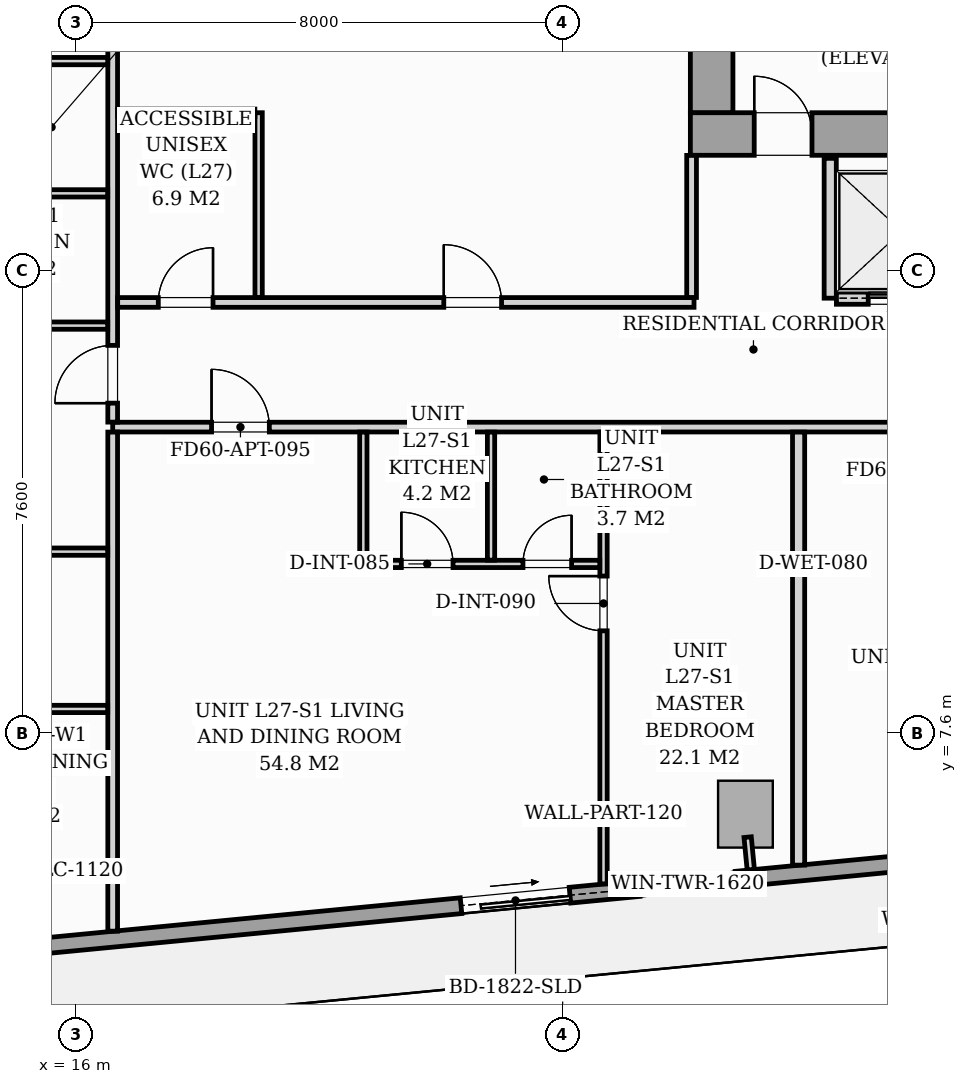
"""IFC4 building model, lengths in metres.
Left out: names, types, materials, properties, quantities, classifications, styles, units other than length and angle.
Written with IfcOpenShell. Run it as: python <this file> out.ifc"""

import sys

from ifc_helpers import new_model, si_unit, direction, frame, frame_2d, origin, origin_2d, place, context, subcontext, project, spatial, rectangle, i_section, extrude, source, transform, mapped, element, fill, save


model = new_model("IFC4")
c1 = context("Model", 3, precision=1e-05, world=origin(), true_north=direction((0.0, 1.0)))
c2 = subcontext(c1, "Body", "Model", "MODEL_VIEW")
j1 = project(units=[si_unit("LENGTHUNIT", "METRE"), si_unit("PLANEANGLEUNIT", "RADIAN")], contexts=[c1])
p1 = place(None, origin())
s1 = spatial("IfcSite", under=j1, at=p1, CompositionType="ELEMENT")
p2 = place(p1, origin())
s2 = spatial("IfcBuilding", under=s1, at=p2, CompositionType="ELEMENT")
p3 = place(p2, frame((0.0, 0.0, 97.0)))
s3 = spatial("IfcBuildingStorey", under=s2, at=p3, CompositionType="ELEMENT", Elevation=97.0)
m1 = source(origin(), c2, "Body", "SweptSolid", [
    extrude(i_section(OverallWidth=0.427, OverallDepth=0.483, WebThickness=0.051, FlangeThickness=0.082, FilletRadius=0.018, at=origin_2d()), origin(), (0.0, 0.0, 1.0), 3.196),
])
p4 = place(p3, frame((26.4, 17.4, 0.002), z_axis=(0.0, 0.0, 1.0), x_axis=(1.0, 0.0, 0.0)))
e1 = element("IfcColumn", 1, at=p4, inside=s3, PredefinedType="PILASTER", context=c2, shape_type="MappedRepresentation", body=[
    mapped(m1, transform((0.0, 0.0, 0.0), scale=1.0)),
])
m2 = source(origin(), c2, "Body", "SweptSolid", [
    extrude(rectangle(XDim=0.9, YDim=1.1, at=origin_2d()), origin(), (0.0, 0.0, 1.0), 3.196),
])
p5 = place(p3, frame((27.006, 6.265, 0.002), z_axis=(0.0, 0.0, 1.0), x_axis=(0.995396198367, 0.09584575252, 0.0)))
e2 = element("IfcColumn", 2, at=p5, inside=s3, PredefinedType="COLUMN", context=c2, shape_type="MappedRepresentation", body=[
    mapped(m2, transform((0.0, 0.0, 0.0), scale=1.0)),
])
p6 = place(p3, frame((31.994, 5.69, 0.0), z_axis=(0.0, 0.0, 1.0), x_axis=(-0.995396521236, -0.095842399342, 0.0)))
e3 = element("IfcWall", 3, at=p6, inside=s3, PredefinedType="STANDARD", context=c2, shape_type="SweptSolid", body=[
    extrude(rectangle(XDim=19.11, YDim=0.26, at=frame_2d((9.555, 0.0))), origin(), (0.0, 0.0, 1.0), 2.94),
])
p7 = place(p6, frame((7.91, 0.0, 0.0)))
e4 = element("IfcOpeningElement", 4, at=p7, cuts=e3, PredefinedType="OPENING", context=c2, shape_type="SweptSolid", body=[
    extrude(rectangle(XDim=1.8, YDim=2.06, at=frame_2d((0.9, 1.03))), frame((0.0, 0.14, 0.0), z_axis=(0.0, -1.0, 0.0), x_axis=(1.0, 0.0, 0.0)), (0.0, 0.0, 1.0), 0.28),
])
p8 = place(p6, frame((0.7, 0.0, 0.65)))
e5 = element("IfcOpeningElement", 5, at=p8, cuts=e3, PredefinedType="OPENING", context=c2, shape_type="SweptSolid", body=[
    extrude(rectangle(XDim=1.6, YDim=1.5, at=frame_2d((0.8, 0.75))), frame((0.0, 0.14, 0.0), z_axis=(0.0, -1.0, 0.0), x_axis=(1.0, 0.0, 0.0)), (0.0, 0.0, 1.0), 0.28),
])
p9 = place(p6, frame((5.167, 0.0, 0.75)))
e6 = element("IfcOpeningElement", 6, at=p9, cuts=e3, PredefinedType="OPENING", context=c2, shape_type="SweptSolid", body=[
    extrude(rectangle(XDim=1.6, YDim=1.5, at=frame_2d((0.8, 0.75))), frame((0.0, 0.14, 0.0), z_axis=(0.0, -1.0, 0.0), x_axis=(1.0, 0.0, 0.0)), (0.0, 0.0, 1.0), 0.28),
])
p10 = place(p3, frame((26.1, 17.45, 0.0), z_axis=(0.0, 0.0, 1.0), x_axis=(1.0, 0.0, 0.0)))
e7 = element("IfcWall", 7, at=p10, inside=s3, PredefinedType="SHEAR", context=c2, shape_type="SweptSolid", body=[
    extrude(rectangle(XDim=19.8, YDim=0.7, at=frame_2d((9.9, 0.0))), origin(), (0.0, 0.0, 1.0), 3.2),
])
p11 = place(p10, frame((1.05, 0.0, 0.0)))
e8 = element("IfcOpeningElement", 8, at=p11, cuts=e7, PredefinedType="OPENING", context=c2, shape_type="SweptSolid", body=[
    extrude(rectangle(XDim=0.95, YDim=2.06, at=frame_2d((0.475, 1.03))), frame((0.0, 0.36, 0.0), z_axis=(0.0, -1.0, 0.0), x_axis=(1.0, 0.0, 0.0)), (0.0, 0.0, 1.0), 0.72),
])
p12 = place(p10, frame((9.48, 0.0, 0.0)))
e9 = element("IfcOpeningElement", 9, at=p12, cuts=e7, PredefinedType="OPENING", context=c2, shape_type="SweptSolid", body=[
    extrude(rectangle(XDim=0.85, YDim=2.0, at=frame_2d((0.425, 1.0))), frame((0.0, 0.36, 0.0), z_axis=(0.0, -1.0, 0.0), x_axis=(1.0, 0.0, 0.0)), (0.0, 0.0, 1.0), 0.72),
])
p13 = place(p10, frame((17.65, 0.0, 0.0)))
e10 = element("IfcOpeningElement", 10, at=p13, cuts=e7, PredefinedType="OPENING", context=c2, shape_type="SweptSolid", body=[
    extrude(rectangle(XDim=0.95, YDim=2.06, at=frame_2d((0.475, 1.03))), frame((0.0, 0.36, 0.0), z_axis=(0.0, -1.0, 0.0), x_axis=(1.0, 0.0, 0.0)), (0.0, 0.0, 1.0), 0.72),
])
p14 = place(p3, frame((26.45, 17.802, 0.0), z_axis=(0.0, 0.0, 1.0), x_axis=(0.0, 1.0, 0.0)))
e11 = element("IfcWall", 11, at=p14, inside=s3, PredefinedType="SHEAR", context=c2, shape_type="SweptSolid", body=[
    extrude(rectangle(XDim=5.796, YDim=0.7, at=frame_2d((2.898, 0.0))), origin(), (0.0, 0.0, 1.0), 3.2),
])
p15 = place(p3, frame((28.4, 14.75, 0.0), z_axis=(0.0, 0.0, 1.0), x_axis=(0.0, 1.0, 0.0)))
e12 = element("IfcWall", 12, at=p15, inside=s3, PredefinedType="PARTITIONING", context=c2, shape_type="SweptSolid", body=[
    extrude(rectangle(XDim=2.3, YDim=0.2, at=frame_2d((1.15, 0.0))), origin(), (0.0, 0.0, 1.0), 2.94),
])
p16 = place(p3, frame((28.502, 14.75, 0.0), z_axis=(0.0, 0.0, 1.0), x_axis=(1.0, 0.0, 0.0)))
e13 = element("IfcWall", 13, at=p16, inside=s3, PredefinedType="PARTITIONING", context=c2, shape_type="SweptSolid", body=[
    extrude(rectangle(XDim=2.146, YDim=0.2, at=frame_2d((1.073, 0.0))), origin(), (0.0, 0.0, 1.0), 2.94),
])
p17 = place(p16, frame((0.523, 0.0, 0.0)))
e14 = element("IfcOpeningElement", 14, at=p17, cuts=e13, PredefinedType="OPENING", context=c2, shape_type="SweptSolid", body=[
    extrude(rectangle(XDim=1.05, YDim=2.08, at=frame_2d((0.525, 1.04))), frame((0.0, 0.11, 0.0), z_axis=(0.0, -1.0, 0.0), x_axis=(1.0, 0.0, 0.0)), (0.0, 0.0, 1.0), 0.22),
])
p18 = place(p3, frame((16.6, 12.63, 0.0), z_axis=(0.0, 0.0, 1.0), x_axis=(1.0, 0.0, 0.0)))
e15 = element("IfcWall", 15, at=p18, inside=s3, PredefinedType="PARTITIONING", context=c2, shape_type="SweptSolid", body=[
    extrude(rectangle(XDim=37.6, YDim=0.16, at=frame_2d((18.8, 0.0))), origin(), (0.0, 0.0, 1.0), 2.94),
])
p19 = place(p18, frame((1.626, 0.0, 0.0)))
e16 = element("IfcOpeningElement", 16, at=p19, cuts=e15, PredefinedType="OPENING", context=c2, shape_type="SweptSolid", body=[
    extrude(rectangle(XDim=0.95, YDim=2.06, at=frame_2d((0.475, 1.03))), frame((0.0, 0.09, 0.0), z_axis=(0.0, -1.0, 0.0), x_axis=(1.0, 0.0, 0.0)), (0.0, 0.0, 1.0), 0.18),
])
p20 = place(p18, frame((13.46, 0.0, 0.0)))
e17 = element("IfcOpeningElement", 17, at=p20, cuts=e15, PredefinedType="OPENING", context=c2, shape_type="SweptSolid", body=[
    extrude(rectangle(XDim=0.95, YDim=2.06, at=frame_2d((0.475, 1.03))), frame((0.0, 0.09, 0.0), z_axis=(0.0, -1.0, 0.0), x_axis=(1.0, 0.0, 0.0)), (0.0, 0.0, 1.0), 0.18),
])
p21 = place(p18, frame((26.522, 0.0, 0.0)))
e18 = element("IfcOpeningElement", 18, at=p21, cuts=e15, PredefinedType="OPENING", context=c2, shape_type="SweptSolid", body=[
    extrude(rectangle(XDim=0.95, YDim=2.06, at=frame_2d((0.475, 1.03))), frame((0.0, 0.09, 0.0), z_axis=(0.0, -1.0, 0.0), x_axis=(1.0, 0.0, 0.0)), (0.0, 0.0, 1.0), 0.18),
])
p22 = place(p3, frame((16.6, 4.341, 0.0), z_axis=(0.0, 0.0, 1.0), x_axis=(0.0, 1.0, 0.0)))
e19 = element("IfcWall", 19, at=p22, inside=s3, PredefinedType="PARTITIONING", context=c2, shape_type="SweptSolid", body=[
    extrude(rectangle(XDim=8.207, YDim=0.16, at=frame_2d((4.104, 0.0))), origin(), (0.0, 0.0, 1.0), 2.94),
])
p23 = place(p3, frame((16.6, 12.712, 0.0), z_axis=(0.0, 0.0, 1.0), x_axis=(0.0, 1.0, 0.0)))
e20 = element("IfcWall", 20, at=p23, inside=s3, PredefinedType="PARTITIONING", context=c2, shape_type="SweptSolid", body=[
    extrude(rectangle(XDim=11.195, YDim=0.16, at=frame_2d((5.598, 0.0))), origin(), (0.0, 0.0, 1.0), 2.94),
])
p24 = place(p23, frame((0.312, 0.0, 0.0)))
e21 = element("IfcOpeningElement", 21, at=p24, cuts=e20, PredefinedType="OPENING", context=c2, shape_type="SweptSolid", body=[
    extrude(rectangle(XDim=0.95, YDim=2.06, at=frame_2d((0.475, 1.03))), frame((0.0, 0.09, 0.0), z_axis=(0.0, -1.0, 0.0), x_axis=(1.0, 0.0, 0.0)), (0.0, 0.0, 1.0), 0.18),
])
p25 = place(p3, frame((24.672, 5.118, 0.0), z_axis=(0.0, 0.0, 1.0), x_axis=(0.0, 1.0, 0.0)))
e22 = element("IfcWall", 22, at=p25, inside=s3, PredefinedType="PARTITIONING", context=c2, shape_type="SweptSolid", body=[
    extrude(rectangle(XDim=7.43, YDim=0.12, at=frame_2d((3.715, 0.0))), origin(), (0.0, 0.0, 1.0), 2.94),
])
p26 = place(p25, frame((4.162, 0.0, 0.0)))
e23 = element("IfcOpeningElement", 23, at=p26, cuts=e22, PredefinedType="OPENING", context=c2, shape_type="SweptSolid", body=[
    extrude(rectangle(XDim=0.9, YDim=2.05, at=frame_2d((0.45, 1.025))), frame((0.0, 0.07, 0.0), z_axis=(0.0, -1.0, 0.0), x_axis=(1.0, 0.0, 0.0)), (0.0, 0.0, 1.0), 0.14),
])
p27 = place(p3, frame((20.722, 10.38, 0.0), z_axis=(0.0, 0.0, 1.0), x_axis=(1.0, 0.0, 0.0)))
e24 = element("IfcWall", 24, at=p27, inside=s3, PredefinedType="PARTITIONING", context=c2, shape_type="SweptSolid", body=[
    extrude(rectangle(XDim=3.888, YDim=0.12, at=frame_2d((1.944, 0.0))), origin(), (0.0, 0.0, 1.0), 2.94),
])
p28 = place(p27, frame((0.625, 0.0, 0.0)))
e25 = element("IfcOpeningElement", 25, at=p28, cuts=e24, PredefinedType="OPENING", context=c2, shape_type="SweptSolid", body=[
    extrude(rectangle(XDim=0.85, YDim=2.05, at=frame_2d((0.425, 1.025))), frame((0.0, 0.07, 0.0), z_axis=(0.0, -1.0, 0.0), x_axis=(1.0, 0.0, 0.0)), (0.0, 0.0, 1.0), 0.14),
])
p29 = place(p27, frame((2.625, 0.0, 0.0)))
e26 = element("IfcOpeningElement", 26, at=p29, cuts=e24, PredefinedType="OPENING", context=c2, shape_type="SweptSolid", body=[
    extrude(rectangle(XDim=0.8, YDim=2.02, at=frame_2d((0.4, 1.01))), frame((0.0, 0.07, 0.0), z_axis=(0.0, -1.0, 0.0), x_axis=(1.0, 0.0, 0.0)), (0.0, 0.0, 1.0), 0.14),
])
for number, where, z_axis, x_axis in (
    (27, (22.822, 10.442, 0.0), (0.0, 0.0, 1.0), (0.0, 1.0, 0.0)),
    (28, (20.722, 10.442, 0.0), (0.0, 0.0, 1.0), (0.0, 1.0, 0.0)),
):
    element("IfcWall", number, at=place(p3, frame(where, z_axis=z_axis, x_axis=x_axis)), inside=s3, PredefinedType="PARTITIONING", context=c2, shape_type="SweptSolid", body=[
        extrude(rectangle(XDim=2.106, YDim=0.12, at=frame_2d((1.053, 0.0))), origin(), (0.0, 0.0, 1.0), 2.94),
    ])
p30 = place(p3, frame((27.88, 5.427, 0.0), z_axis=(0.0, 0.0, 1.0), x_axis=(0.0, 1.0, 0.0)))
e29 = element("IfcWall", 29, at=p30, inside=s3, PredefinedType="PARTITIONING", context=c2, shape_type="SweptSolid", body=[
    extrude(rectangle(XDim=7.121, YDim=0.2, at=frame_2d((3.561, 0.0))), origin(), (0.0, 0.0, 1.0), 2.94),
])
p31 = place(p3, frame((14.262, 16.474, 0.0), z_axis=(0.0, 0.0, 1.0), x_axis=(1.0, 0.0, 0.0)))
e30 = element("IfcWall", 30, at=p31, inside=s3, PredefinedType="PARTITIONING", context=c2, shape_type="SweptSolid", body=[
    extrude(rectangle(XDim=2.256, YDim=0.12, at=frame_2d((1.128, 0.0))), origin(), (0.0, 0.0, 1.0), 2.94),
])
p32 = place(p3, frame((14.262, 14.299, 0.0), z_axis=(0.0, 0.0, 1.0), x_axis=(1.0, 0.0, 0.0)))
e31 = element("IfcWall", 31, at=p32, inside=s3, PredefinedType="PARTITIONING", context=c2, shape_type="SweptSolid", body=[
    extrude(rectangle(XDim=2.256, YDim=0.12, at=frame_2d((1.128, 0.0))), origin(), (0.0, 0.0, 1.0), 2.063),
])
p33 = place(p3, frame((14.262, 18.649, 0.0), z_axis=(0.0, 0.0, 1.0), x_axis=(1.0, 0.0, 0.0)))
e32 = element("IfcWall", 32, at=p33, inside=s3, PredefinedType="PARTITIONING", context=c2, shape_type="SweptSolid", body=[
    extrude(rectangle(XDim=2.256, YDim=0.12, at=frame_2d((1.128, 0.0))), origin(), (0.0, 0.0, 1.0), 2.94),
])
p34 = place(p3, frame((10.142, 7.995, 0.0), z_axis=(0.0, 0.0, 1.0), x_axis=(1.0, 0.0, 0.0)))
e33 = element("IfcWall", 33, at=p34, inside=s3, PredefinedType="PARTITIONING", context=c2, shape_type="SweptSolid", body=[
    extrude(rectangle(XDim=6.376, YDim=0.12, at=frame_2d((3.188, 0.0))), origin(), (0.0, 0.0, 1.0), 2.94),
])
p35 = place(p34, frame((2.757, 0.0, 0.0)))
e34 = element("IfcOpeningElement", 34, at=p35, cuts=e33, PredefinedType="OPENING", context=c2, shape_type="SweptSolid", body=[
    extrude(rectangle(XDim=0.85, YDim=2.05, at=frame_2d((0.425, 1.025))), frame((0.0, 0.07, 0.0), z_axis=(0.0, -1.0, 0.0), x_axis=(1.0, 0.0, 0.0)), (0.0, 0.0, 1.0), 0.14),
])
p36 = place(p3, frame((9.893, 10.582, 0.0), z_axis=(0.0, 0.0, 1.0), x_axis=(1.0, 0.0, 0.0)))
e35 = element("IfcWall", 35, at=p36, inside=s3, PredefinedType="PARTITIONING", context=c2, shape_type="SweptSolid", body=[
    extrude(rectangle(XDim=6.625, YDim=0.12, at=frame_2d((3.312, 0.0))), origin(), (0.0, 0.0, 1.0), 2.94),
])
p37 = place(p36, frame((2.881, 0.0, 0.0)))
e36 = element("IfcOpeningElement", 36, at=p37, cuts=e35, PredefinedType="OPENING", context=c2, shape_type="SweptSolid", body=[
    extrude(rectangle(XDim=0.85, YDim=2.05, at=frame_2d((0.425, 1.025))), frame((0.0, 0.07, 0.0), z_axis=(0.0, -1.0, 0.0), x_axis=(1.0, 0.0, 0.0)), (0.0, 0.0, 1.0), 0.14),
])
p38 = place(p3, frame((16.682, 14.68, 0.0), z_axis=(0.0, 0.0, 1.0), x_axis=(1.0, 0.0, 0.0)))
e37 = element("IfcWall", 37, at=p38, inside=s3, PredefinedType="PARTITIONING", context=c2, shape_type="SweptSolid", body=[
    extrude(rectangle(XDim=9.478, YDim=0.16, at=frame_2d((4.739, 0.0))), origin(), (0.0, 0.0, 1.0), 2.94),
])
p39 = place(p38, frame((0.668, 0.0, 0.0)))
e38 = element("IfcOpeningElement", 38, at=p39, cuts=e37, PredefinedType="OPENING", context=c2, shape_type="SweptSolid", body=[
    extrude(rectangle(XDim=0.9, YDim=2.05, at=frame_2d((0.45, 1.025))), frame((0.0, 0.09, 0.0), z_axis=(0.0, -1.0, 0.0), x_axis=(1.0, 0.0, 0.0)), (0.0, 0.0, 1.0), 0.18),
])
p40 = place(p38, frame((5.363, 0.0, 0.0)))
e39 = element("IfcOpeningElement", 39, at=p40, cuts=e37, PredefinedType="OPENING", context=c2, shape_type="SweptSolid", body=[
    extrude(rectangle(XDim=0.95, YDim=2.06, at=frame_2d((0.475, 1.03))), frame((0.0, 0.09, 0.0), z_axis=(0.0, -1.0, 0.0), x_axis=(1.0, 0.0, 0.0)), (0.0, 0.0, 1.0), 0.18),
])
p41 = place(p3, frame((26.12, 14.762, 0.0), z_axis=(0.0, 0.0, 1.0), x_axis=(0.0, 1.0, 0.0)))
e40 = element("IfcWall", 40, at=p41, inside=s3, PredefinedType="PARTITIONING", context=c2, shape_type="SweptSolid", body=[
    extrude(rectangle(XDim=2.336, YDim=0.16, at=frame_2d((1.168, 0.0))), origin(), (0.0, 0.0, 1.0), 2.94),
])
p42 = place(p3, frame((19.0, 14.762, 0.0), z_axis=(0.0, 0.0, 1.0), x_axis=(0.0, 1.0, 0.0)))
e41 = element("IfcWall", 41, at=p42, inside=s3, PredefinedType="PARTITIONING", context=c2, shape_type="SweptSolid", body=[
    extrude(rectangle(XDim=3.038, YDim=0.12, at=frame_2d((1.519, 0.0))), origin(), (0.0, 0.0, 1.0), 2.94),
])
p43 = place(p3, frame((16.682, 17.8, 0.0), z_axis=(0.0, 0.0, 1.0), x_axis=(1.0, 0.0, 0.0)))
e42 = element("IfcWall", 42, at=p43, inside=s3, PredefinedType="PARTITIONING", context=c2, shape_type="SweptSolid", body=[
    extrude(rectangle(XDim=2.256, YDim=0.12, at=frame_2d((1.128, 0.0))), origin(), (0.0, 0.0, 1.0), 2.94),
])
p44 = place(p3, frame((27.042, 5.887, 0.0), z_axis=(0.0, 0.0, 1.0), x_axis=(0.096222656154, -0.995359834654, 0.0)))
e43 = element("IfcWall", 43, at=p44, inside=s3, PredefinedType="PARTITIONING", context=c2, shape_type="SweptSolid", body=[
    extrude(rectangle(XDim=0.538, YDim=0.12, at=frame_2d((0.269, 0.0))), origin(), (0.0, 0.0, 1.0), 2.94),
])
m3 = source(origin(), c2, "Body", "SweptSolid", [
    extrude(rectangle(XDim=1.8, YDim=2.06, at=frame_2d((0.9, 1.03))), frame((0.0, 0.025, 0.0), z_axis=(0.0, -1.0, 0.0), x_axis=(1.0, 0.0, 0.0)), (0.0, 0.0, 1.0), 0.05),
])
p45 = place(p7, origin())
e44 = element("IfcDoor", 44, at=p45, inside=s3, OperationType="SLIDING_TO_LEFT", PredefinedType="DOOR", context=c2, shape_type="MappedRepresentation", body=[
    mapped(m3, transform((0.0, 0.0, 0.0), scale=1.0)),
])
fill(e4, e44)
m4 = source(origin(), c2, "Body", "SweptSolid", [
    extrude(rectangle(XDim=1.6, YDim=1.5, at=frame_2d((0.8, 0.75))), frame((0.0, 0.03, 0.0), z_axis=(0.0, -1.0, 0.0), x_axis=(1.0, 0.0, 0.0)), (0.0, 0.0, 1.0), 0.06),
])
p46 = place(p9, origin())
e45 = element("IfcWindow", 45, at=p46, inside=s3, PartitioningType="SINGLE_PANEL", PredefinedType="WINDOW", context=c2, shape_type="MappedRepresentation", body=[
    mapped(m4, transform((0.0, 0.0, 0.0), scale=1.0)),
])
fill(e6, e45)
m5 = source(origin(), c2, "Body", "SweptSolid", [
    extrude(rectangle(XDim=0.95, YDim=2.06, at=frame_2d((0.475, 1.03))), frame((0.0, 0.025, 0.0), z_axis=(0.0, -1.0, 0.0), x_axis=(1.0, 0.0, 0.0)), (0.0, 0.0, 1.0), 0.05),
])
p47 = place(p11, origin())
e46 = element("IfcDoor", 46, at=p47, inside=s3, OperationType="SINGLE_SWING_LEFT", PredefinedType="DOOR", context=c2, shape_type="MappedRepresentation", body=[
    mapped(m5, transform((0.0, 0.0, 0.0), scale=1.0)),
])
fill(e8, e46)
m6 = source(origin(), c2, "Body", "SweptSolid", [
    extrude(rectangle(XDim=1.05, YDim=2.08, at=frame_2d((0.525, 1.04))), frame((0.0, 0.025, 0.0), z_axis=(0.0, -1.0, 0.0), x_axis=(1.0, 0.0, 0.0)), (0.0, 0.0, 1.0), 0.05),
])
p48 = place(p17, origin())
e47 = element("IfcDoor", 47, at=p48, inside=s3, OperationType="SLIDING_TO_LEFT", PredefinedType="DOOR", context=c2, shape_type="MappedRepresentation", body=[
    mapped(m6, transform((0.0, 0.0, 0.0), scale=1.0)),
])
fill(e14, e47)
m7 = source(origin(), c2, "Body", "SweptSolid", [
    extrude(rectangle(XDim=0.95, YDim=2.06, at=frame_2d((0.475, 1.03))), frame((0.0, 0.025, 0.0), z_axis=(0.0, -1.0, 0.0), x_axis=(1.0, 0.0, 0.0)), (0.0, 0.0, 1.0), 0.05),
])
p49 = place(p19, origin())
e48 = element("IfcDoor", 48, at=p49, inside=s3, OperationType="SINGLE_SWING_LEFT", PredefinedType="DOOR", context=c2, shape_type="MappedRepresentation", body=[
    mapped(m7, transform((0.0, 0.0, 0.0), scale=1.0)),
])
fill(e16, e48)
m8 = source(origin(), c2, "Body", "SweptSolid", [
    extrude(rectangle(XDim=0.9, YDim=2.05, at=frame_2d((0.45, 1.025))), frame((0.0, 0.025, 0.0), z_axis=(0.0, -1.0, 0.0), x_axis=(1.0, 0.0, 0.0)), (0.0, 0.0, 1.0), 0.05),
])
p50 = place(p26, origin())
e49 = element("IfcDoor", 49, at=p50, inside=s3, OperationType="SINGLE_SWING_RIGHT", PredefinedType="DOOR", context=c2, shape_type="MappedRepresentation", body=[
    mapped(m8, transform((0.0, 0.0, 0.0), scale=1.0)),
])
fill(e23, e49)
m9 = source(origin(), c2, "Body", "SweptSolid", [
    extrude(rectangle(XDim=0.85, YDim=2.05, at=frame_2d((0.425, 1.025))), frame((0.0, 0.025, 0.0), z_axis=(0.0, -1.0, 0.0), x_axis=(1.0, 0.0, 0.0)), (0.0, 0.0, 1.0), 0.05),
])
p51 = place(p28, origin())
e50 = element("IfcDoor", 50, at=p51, inside=s3, OperationType="SINGLE_SWING_LEFT", PredefinedType="DOOR", context=c2, shape_type="MappedRepresentation", body=[
    mapped(m9, transform((0.0, 0.0, 0.0), scale=1.0)),
])
fill(e25, e50)
m10 = source(origin(), c2, "Body", "SweptSolid", [
    extrude(rectangle(XDim=0.8, YDim=2.02, at=frame_2d((0.4, 1.01))), frame((0.0, 0.025, 0.0), z_axis=(0.0, -1.0, 0.0), x_axis=(1.0, 0.0, 0.0)), (0.0, 0.0, 1.0), 0.05),
])
p52 = place(p29, origin())
e51 = element("IfcDoor", 51, at=p52, inside=s3, OperationType="SINGLE_SWING_RIGHT", PredefinedType="DOOR", context=c2, shape_type="MappedRepresentation", body=[
    mapped(m10, transform((0.0, 0.0, 0.0), scale=1.0)),
])
fill(e26, e51)
p53 = place(p24, origin())
e52 = element("IfcDoor", 52, at=p53, inside=s3, OperationType="SINGLE_SWING_LEFT", PredefinedType="DOOR", context=c2, shape_type="MappedRepresentation", body=[
    mapped(m7, transform((0.0, 0.0, 0.0), scale=1.0)),
])
fill(e21, e52)
p54 = place(p39, origin())
e53 = element("IfcDoor", 53, at=p54, inside=s3, OperationType="SINGLE_SWING_RIGHT", PredefinedType="DOOR", context=c2, shape_type="MappedRepresentation", body=[
    mapped(m8, transform((0.0, 0.0, 0.0), scale=1.0)),
])
fill(e38, e53)
p55 = place(p40, origin())
e54 = element("IfcDoor", 54, at=p55, inside=s3, OperationType="SINGLE_SWING_LEFT", PredefinedType="DOOR", context=c2, shape_type="MappedRepresentation", body=[
    mapped(m7, transform((0.0, 0.0, 0.0), scale=1.0)),
])
fill(e39, e54)
save(model, sys.argv[1])
